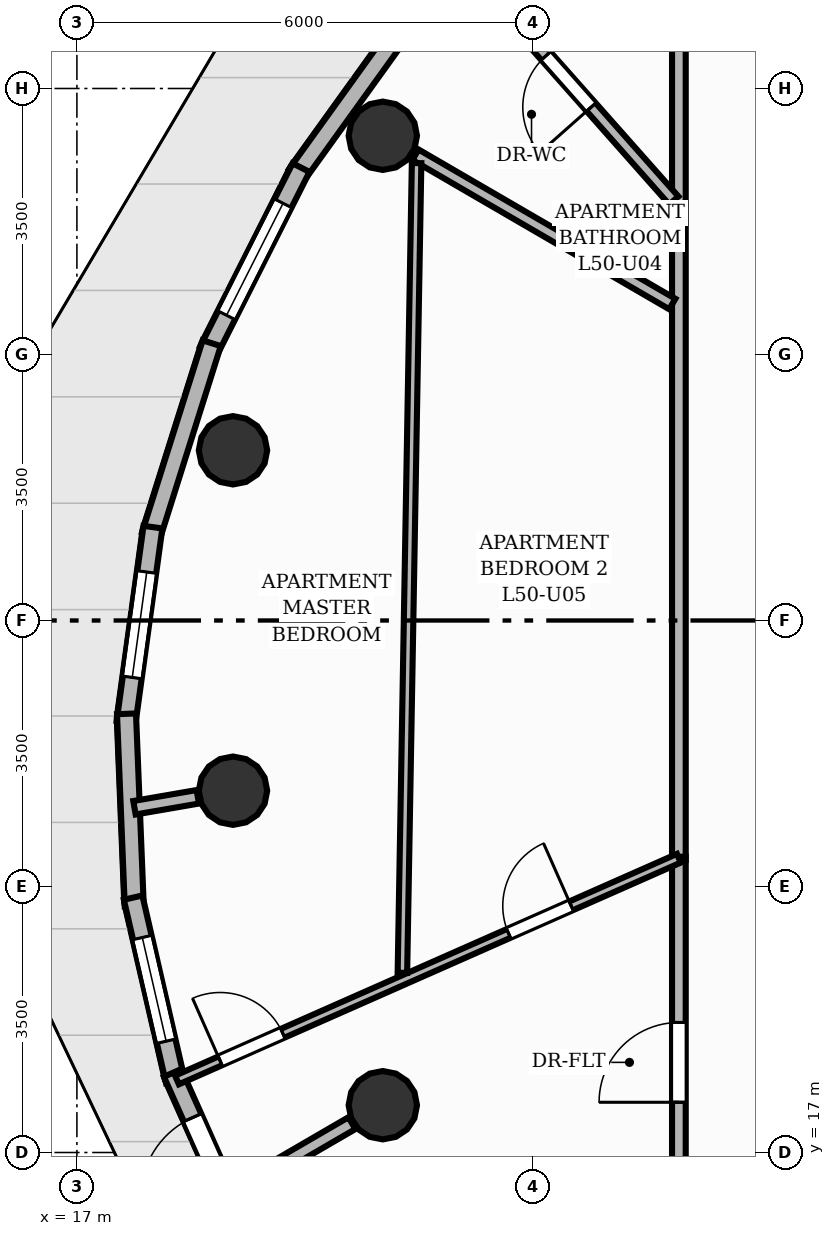
"""IFC4 building model, lengths in metres.
Left out: names, types, materials, properties, quantities, classifications, styles, units other than length and angle.
Written with IfcOpenShell. Run it as: python <this file> out.ifc"""

import sys

from ifc_helpers import new_model, si_unit, direction, frame, frame_2d, origin, origin_2d, place, context, subcontext, project, spatial, rectangle, circle, extrude, element, fill, save


model = new_model("IFC4")
c1 = context("Model", 3, precision=1e-05, world=origin(), true_north=direction((0.0, 1.0)))
c2 = subcontext(c1, "Body", "Model", "MODEL_VIEW")
j1 = project(units=[si_unit("LENGTHUNIT", "METRE"), si_unit("PLANEANGLEUNIT", "RADIAN")], contexts=[c1])
p1 = place(None, origin())
s1 = spatial("IfcSite", under=j1, at=p1, CompositionType="ELEMENT")
p2 = place(p1, origin())
s2 = spatial("IfcBuilding", under=s1, at=p2, CompositionType="ELEMENT")
p3 = place(p2, frame((0.0, 0.0, 169.44)))
s3 = spatial("IfcBuildingStorey", under=s2, at=p3, CompositionType="ELEMENT", Elevation=169.44)
for number, where, z_axis, x_axis in (
    (1, (21.025, 30.378, 0.0), (0.0, 0.0, 1.0), (1.0, 0.0, 0.0)),
    (2, (19.054, 26.24, 0.0), (0.0, 0.0, 1.0), (1.0, 0.0, 0.0)),
    (3, (19.054, 21.76, 0.0), (0.0, 0.0, 1.0), (1.0, 0.0, 0.0)),
    (4, (21.025, 17.622, 0.0), (0.0, 0.0, 1.0), (1.0, 0.0, 0.0)),
):
    element("IfcColumn", number, at=place(p3, frame(where, z_axis=z_axis, x_axis=x_axis)), inside=s3, PredefinedType="COLUMN", context=c2, shape_type="SweptSolid", body=[
        extrude(circle(Radius=0.45, at=origin_2d()), origin(), (0.0, 0.0, 1.0), 3.2),
    ])
p4 = place(p3, frame((19.892, 29.865, 0.0), z_axis=(0.0, 0.0, 1.0), x_axis=(0.583975860001, 0.811771023711, 0.0)))
e5 = element("IfcWall", 5, at=p4, inside=s3, PredefinedType="SOLIDWALL", context=c2, shape_type="SweptSolid", body=[
    extrude(rectangle(XDim=2.738, YDim=0.25, at=frame_2d((1.369, 0.0))), origin(), (0.0, 0.0, 1.0), 2.96),
])
p5 = place(p3, frame((18.732, 27.547, 0.0), z_axis=(0.0, 0.0, 1.0), x_axis=(0.450391703917, 0.892831066352, 0.0)))
e6 = element("IfcWall", 6, at=p5, inside=s3, PredefinedType="SOLIDWALL", context=c2, shape_type="SweptSolid", body=[
    extrude(rectangle(XDim=2.702, YDim=0.25, at=frame_2d((1.351, 0.0))), origin(), (0.0, 0.0, 1.0), 2.96),
])
p6 = place(p5, frame((0.526, 0.0, 0.85)))
e7 = element("IfcOpeningElement", 7, at=p6, cuts=e6, PredefinedType="OPENING", context=c2, shape_type="SweptSolid", body=[
    extrude(rectangle(XDim=1.65, YDim=1.55, at=frame_2d((0.825, 0.775))), frame((0.0, 0.135, 0.0), z_axis=(0.0, -1.0, 0.0), x_axis=(1.0, 0.0, 0.0)), (0.0, 0.0, 1.0), 0.27),
])
p7 = place(p3, frame((17.976, 25.12, 0.0), z_axis=(0.0, 0.0, 1.0), x_axis=(0.300796358401, 0.953688392911, 0.0)))
e8 = element("IfcWall", 8, at=p7, inside=s3, PredefinedType="SOLIDWALL", context=c2, shape_type="SweptSolid", body=[
    extrude(rectangle(XDim=2.651, YDim=0.25, at=frame_2d((1.325, 0.0))), origin(), (0.0, 0.0, 1.0), 2.96),
])
p8 = place(p3, frame((17.647, 22.66, 0.0), z_axis=(0.0, 0.0, 1.0), x_axis=(0.136289981327, 0.990668986589, 0.0)))
e9 = element("IfcWall", 9, at=p8, inside=s3, PredefinedType="SOLIDWALL", context=c2, shape_type="SweptSolid", body=[
    extrude(rectangle(XDim=2.592, YDim=0.25, at=frame_2d((1.296, 0.0))), origin(), (0.0, 0.0, 1.0), 2.96),
])
p9 = place(p8, frame((0.596, 0.0, 0.85)))
e10 = element("IfcOpeningElement", 10, at=p9, cuts=e9, PredefinedType="OPENING", context=c2, shape_type="SweptSolid", body=[
    extrude(rectangle(XDim=1.4, YDim=1.55, at=frame_2d((0.7, 0.775))), frame((0.0, 0.135, 0.0), z_axis=(0.0, -1.0, 0.0), x_axis=(1.0, 0.0, 0.0)), (0.0, 0.0, 1.0), 0.27),
])
p10 = place(p3, frame((17.755, 20.242, 0.0), z_axis=(0.0, 0.0, 1.0), x_axis=(-0.040399298921, 0.999183615081, 0.0)))
e11 = element("IfcWall", 11, at=p10, inside=s3, PredefinedType="SOLIDWALL", context=c2, shape_type="SweptSolid", body=[
    extrude(rectangle(XDim=2.532, YDim=0.25, at=frame_2d((1.266, 0.0))), origin(), (0.0, 0.0, 1.0), 2.96),
])
p11 = place(p3, frame((18.295, 17.939, 0.0), z_axis=(0.0, 0.0, 1.0), x_axis=(-0.224175769227, 0.974548728639, 0.0)))
e12 = element("IfcWall", 12, at=p11, inside=s3, PredefinedType="SOLIDWALL", context=c2, shape_type="SweptSolid", body=[
    extrude(rectangle(XDim=2.478, YDim=0.25, at=frame_2d((1.239, 0.0))), origin(), (0.0, 0.0, 1.0), 2.96),
])
p12 = place(p11, frame((0.539, 0.0, 0.85)))
e13 = element("IfcOpeningElement", 13, at=p12, cuts=e12, PredefinedType="OPENING", context=c2, shape_type="SweptSolid", body=[
    extrude(rectangle(XDim=1.4, YDim=1.55, at=frame_2d((0.7, 0.775))), frame((0.0, 0.135, 0.0), z_axis=(0.0, -1.0, 0.0), x_axis=(1.0, 0.0, 0.0)), (0.0, 0.0, 1.0), 0.27),
])
p13 = place(p3, frame((19.251, 15.821, 0.0), z_axis=(0.0, 0.0, 1.0), x_axis=(-0.407346511056, 0.913273682929, 0.0)))
e14 = element("IfcWall", 14, at=p13, inside=s3, PredefinedType="SOLIDWALL", context=c2, shape_type="SweptSolid", body=[
    extrude(rectangle(XDim=2.437, YDim=0.25, at=frame_2d((1.219, 0.0))), origin(), (0.0, 0.0, 1.0), 2.96),
])
p14 = place(p13, frame((0.643, 0.0, 0.0)))
e15 = element("IfcOpeningElement", 15, at=p14, cuts=e14, PredefinedType="OPENING", context=c2, shape_type="SweptSolid", body=[
    extrude(rectangle(XDim=1.15, YDim=2.2, at=frame_2d((0.575, 1.1))), frame((0.0, 0.135, 0.0), z_axis=(0.0, -1.0, 0.0), x_axis=(1.0, 0.0, 0.0)), (0.0, 0.0, 1.0), 0.27),
])
p15 = place(p3, frame((18.591, 21.68, 0.0), z_axis=(0.0, 0.0, 1.0), x_axis=(-0.985336508055, -0.170622290144, 0.0)))
e16 = element("IfcWall", 16, at=p15, inside=s3, PredefinedType="PARTITIONING", context=c2, shape_type="SweptSolid", body=[
    extrude(rectangle(XDim=0.846, YDim=0.18, at=frame_2d((0.423, 0.0))), origin(), (0.0, 0.0, 1.0), 2.404),
])
p16 = place(p3, frame((20.618, 17.386, 0.0), z_axis=(0.0, 0.0, 1.0), x_axis=(-0.864604991586, -0.502452195264, 0.0)))
e17 = element("IfcWall", 17, at=p16, inside=s3, PredefinedType="PARTITIONING", context=c2, shape_type="SweptSolid", body=[
    extrude(rectangle(XDim=1.841, YDim=0.18, at=frame_2d((0.92, 0.0))), origin(), (0.0, 0.0, 1.0), 2.404),
])
p17 = place(p3, frame((24.92, 20.85, 0.0), z_axis=(0.0, 0.0, 1.0), x_axis=(0.0, 1.0, 0.0)))
e18 = element("IfcWall", 18, at=p17, inside=s3, PredefinedType="PARTITIONING", context=c2, shape_type="SweptSolid", body=[
    extrude(rectangle(XDim=11.67, YDim=0.18, at=frame_2d((5.835, 0.0))), origin(), (0.0, 0.0, 1.0), 2.955),
])
p18 = place(p3, frame((24.92, 15.48, 0.0), z_axis=(0.0, 0.0, 1.0), x_axis=(0.0, 1.0, 0.0)))
e19 = element("IfcWall", 19, at=p18, inside=s3, PredefinedType="PARTITIONING", context=c2, shape_type="SweptSolid", body=[
    extrude(rectangle(XDim=5.412, YDim=0.18, at=frame_2d((2.706, 0.0))), origin(), (0.0, 0.0, 1.0), 2.955),
])
p19 = place(p18, frame((2.181, 0.0, 0.0)))
e20 = element("IfcOpeningElement", 20, at=p19, cuts=e19, PredefinedType="OPENING", context=c2, shape_type="SweptSolid", body=[
    extrude(rectangle(XDim=1.05, YDim=2.15, at=frame_2d((0.525, 1.075))), frame((0.0, 0.1, 0.0), z_axis=(0.0, -1.0, 0.0), x_axis=(1.0, 0.0, 0.0)), (0.0, 0.0, 1.0), 0.2),
])
p20 = place(p3, frame((24.854, 29.527, 0.0), z_axis=(0.0, 0.0, 1.0), x_axis=(-0.663007196405, 0.748613022539, 0.0)))
e21 = element("IfcWall", 21, at=p20, inside=s3, PredefinedType="PLUMBINGWALL", context=c2, shape_type="SweptSolid", body=[
    extrude(rectangle(XDim=4.181, YDim=0.16, at=frame_2d((2.09, 0.0))), origin(), (0.0, 0.0, 1.0), 2.692),
])
p21 = place(p20, frame((1.64, 0.0, 0.0)))
e22 = element("IfcOpeningElement", 22, at=p21, cuts=e21, PredefinedType="OPENING", context=c2, shape_type="SweptSolid", body=[
    extrude(rectangle(XDim=0.9, YDim=2.1, at=frame_2d((0.45, 1.05))), frame((0.0, 0.09, 0.0), z_axis=(0.0, -1.0, 0.0), x_axis=(1.0, 0.0, 0.0)), (0.0, 0.0, 1.0), 0.18),
])
p22 = place(p3, frame((24.833, 28.164, 0.0), z_axis=(0.0, 0.0, 1.0), x_axis=(-0.864611299978, 0.50244133981, 0.0)))
e23 = element("IfcWall", 23, at=p22, inside=s3, PredefinedType="PLUMBINGWALL", context=c2, shape_type="SweptSolid", body=[
    extrude(rectangle(XDim=3.909, YDim=0.16, at=frame_2d((1.955, 0.0))), origin(), (0.0, 0.0, 1.0), 2.404),
])
p23 = place(p3, frame((18.317, 17.954, 0.0), z_axis=(0.0, 0.0, 1.0), x_axis=(0.914699105929, 0.404135553512, 0.0)))
e24 = element("IfcWall", 24, at=p23, inside=s3, PredefinedType="PARTITIONING", context=c2, shape_type="SweptSolid", body=[
    extrude(rectangle(XDim=7.219, YDim=0.125, at=frame_2d((3.609, 0.0))), origin(), (0.0, 0.0, 1.0), 2.692),
])
p24 = place(p23, frame((0.621, 0.0, 0.0)))
e25 = element("IfcOpeningElement", 25, at=p24, cuts=e24, PredefinedType="OPENING", context=c2, shape_type="SweptSolid", body=[
    extrude(rectangle(XDim=0.9, YDim=2.1, at=frame_2d((0.45, 1.05))), frame((0.0, 0.073, 0.0), z_axis=(0.0, -1.0, 0.0), x_axis=(1.0, 0.0, 0.0)), (0.0, 0.0, 1.0), 0.145),
])
p25 = place(p23, frame((4.77, 0.0, 0.0)))
e26 = element("IfcOpeningElement", 26, at=p25, cuts=e24, PredefinedType="OPENING", context=c2, shape_type="SweptSolid", body=[
    extrude(rectangle(XDim=0.9, YDim=2.1, at=frame_2d((0.45, 1.05))), frame((0.0, 0.073, 0.0), z_axis=(0.0, -1.0, 0.0), x_axis=(1.0, 0.0, 0.0)), (0.0, 0.0, 1.0), 0.145),
])
p26 = place(p3, frame((21.469, 30.019, 0.0), z_axis=(0.0, 0.0, 1.0), x_axis=(-0.017526694913, -0.999846395686, 0.0)))
e27 = element("IfcWall", 27, at=p26, inside=s3, PredefinedType="PARTITIONING", context=c2, shape_type="SweptSolid", body=[
    extrude(rectangle(XDim=10.656, YDim=0.125, at=frame_2d((5.328, 0.0))), origin(), (0.0, 0.0, 1.0), 2.955),
])
p27 = place(p14, origin())
e28 = element("IfcDoor", 28, at=p27, inside=s3, OperationType="SINGLE_SWING_LEFT", PredefinedType="DOOR", context=c2, shape_type="SweptSolid", body=[
    extrude(rectangle(XDim=1.15, YDim=2.2, at=frame_2d((0.575, 1.1))), frame((0.0, 0.025, 0.0), z_axis=(0.0, -1.0, 0.0), x_axis=(1.0, 0.0, 0.0)), (0.0, 0.0, 1.0), 0.05),
])
fill(e15, e28)
p28 = place(p6, origin())
e29 = element("IfcWindow", 29, at=p28, inside=s3, PartitioningType="SINGLE_PANEL", PredefinedType="WINDOW", context=c2, shape_type="SweptSolid", body=[
    extrude(rectangle(XDim=1.65, YDim=1.55, at=frame_2d((0.825, 0.775))), frame((0.0, 0.03, 0.0), z_axis=(0.0, -1.0, 0.0), x_axis=(1.0, 0.0, 0.0)), (0.0, 0.0, 1.0), 0.06),
])
fill(e7, e29)
p29 = place(p9, origin())
e30 = element("IfcWindow", 30, at=p29, inside=s3, PartitioningType="SINGLE_PANEL", PredefinedType="WINDOW", context=c2, shape_type="SweptSolid", body=[
    extrude(rectangle(XDim=1.4, YDim=1.55, at=frame_2d((0.7, 0.775))), frame((0.0, 0.03, 0.0), z_axis=(0.0, -1.0, 0.0), x_axis=(1.0, 0.0, 0.0)), (0.0, 0.0, 1.0), 0.06),
])
fill(e10, e30)
p30 = place(p12, origin())
e31 = element("IfcWindow", 31, at=p30, inside=s3, PartitioningType="SINGLE_PANEL", PredefinedType="WINDOW", context=c2, shape_type="SweptSolid", body=[
    extrude(rectangle(XDim=1.4, YDim=1.55, at=frame_2d((0.7, 0.775))), frame((0.0, 0.03, 0.0), z_axis=(0.0, -1.0, 0.0), x_axis=(1.0, 0.0, 0.0)), (0.0, 0.0, 1.0), 0.06),
])
fill(e13, e31)
p31 = place(p21, origin())
e32 = element("IfcDoor", 32, at=p31, inside=s3, OperationType="SINGLE_SWING_LEFT", PredefinedType="DOOR", context=c2, shape_type="SweptSolid", body=[
    extrude(rectangle(XDim=0.9, YDim=2.1, at=frame_2d((0.45, 1.05))), frame((0.0, 0.025, 0.0), z_axis=(0.0, -1.0, 0.0), x_axis=(1.0, 0.0, 0.0)), (0.0, 0.0, 1.0), 0.05),
])
fill(e22, e32)
p32 = place(p19, origin())
e33 = element("IfcDoor", 33, at=p32, inside=s3, OperationType="SINGLE_SWING_LEFT", PredefinedType="DOOR", context=c2, shape_type="SweptSolid", body=[
    extrude(rectangle(XDim=1.05, YDim=2.15, at=frame_2d((0.525, 1.075))), frame((0.0, 0.025, 0.0), z_axis=(0.0, -1.0, 0.0), x_axis=(1.0, 0.0, 0.0)), (0.0, 0.0, 1.0), 0.05),
])
fill(e20, e33)
p33 = place(p24, origin())
e34 = element("IfcDoor", 34, at=p33, inside=s3, OperationType="SINGLE_SWING_LEFT", PredefinedType="DOOR", context=c2, shape_type="SweptSolid", body=[
    extrude(rectangle(XDim=0.9, YDim=2.1, at=frame_2d((0.45, 1.05))), frame((0.0, 0.025, 0.0), z_axis=(0.0, -1.0, 0.0), x_axis=(1.0, 0.0, 0.0)), (0.0, 0.0, 1.0), 0.05),
])
fill(e25, e34)
p34 = place(p25, origin())
e35 = element("IfcDoor", 35, at=p34, inside=s3, OperationType="SINGLE_SWING_RIGHT", PredefinedType="DOOR", context=c2, shape_type="SweptSolid", body=[
    extrude(rectangle(XDim=0.9, YDim=2.1, at=frame_2d((0.45, 1.05))), frame((0.0, 0.025, 0.0), z_axis=(0.0, -1.0, 0.0), x_axis=(1.0, 0.0, 0.0)), (0.0, 0.0, 1.0), 0.05),
])
fill(e26, e35)
save(model, sys.argv[1])
